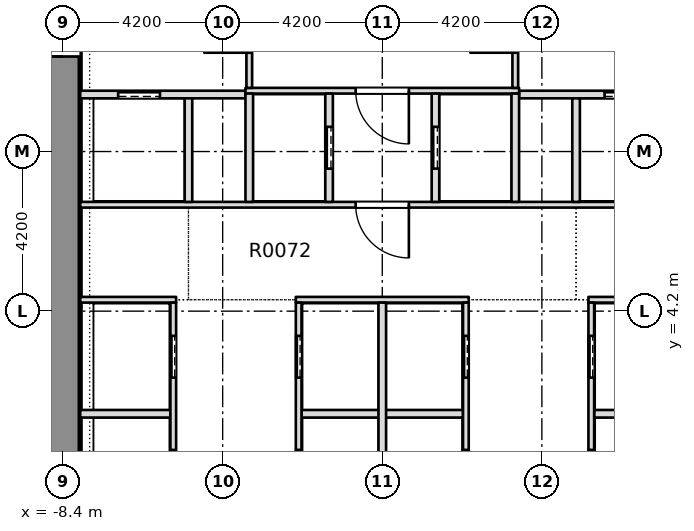
"""IFC4 building model, lengths in metres.
Left out: names, types, materials, properties, quantities, classifications, styles, units other than length and angle.
Written with IfcOpenShell. Run it as: python <this file> out.ifc"""

import sys

from ifc_helpers import new_model, si_unit, direction, frame, frame_2d, origin, place, context, subcontext, project, spatial, rectangle, extrude, element, fill, save


model = new_model("IFC4")
c1 = context("Model", 3, precision=1e-05, world=origin(), true_north=direction((0.0, 1.0)))
c2 = subcontext(c1, "Body", "Model", "MODEL_VIEW")
j1 = project(units=[si_unit("LENGTHUNIT", "METRE"), si_unit("PLANEANGLEUNIT", "RADIAN")], contexts=[c1])
p1 = place(None, origin())
s1 = spatial("IfcSite", under=j1, at=p1, CompositionType="ELEMENT")
p2 = place(p1, origin())
s2 = spatial("IfcBuilding", under=s1, at=p2, CompositionType="ELEMENT")
p3 = place(p2, origin())
s3 = spatial("IfcBuildingStorey", under=s2, at=p3, CompositionType="ELEMENT", Elevation=0.0)
p4 = place(p3, frame((-8.4, -7.5, -0.45), z_axis=(0.0, 0.0, 1.0), x_axis=(0.0, 1.0, 0.0)))
e1 = element("IfcWall", 1, at=p4, inside=s3, PredefinedType="SHEAR", context=c2, shape_type="SweptSolid", body=[
    extrude(rectangle(XDim=28.35, YDim=0.9, at=frame_2d((14.175, 0.0))), origin(), (0.0, 0.0, 1.0), 7.55),
])
p5 = place(p4, frame((18.4, 0.0, 0.45)))
e2 = element("IfcOpeningElement", 2, at=p5, cuts=e1, PredefinedType="OPENING", context=c2, shape_type="SweptSolid", body=[
    extrude(rectangle(XDim=1.2, YDim=2.1, at=frame_2d((0.6, 1.05))), frame((0.0, 0.46, 0.0), z_axis=(0.0, -1.0, 0.0), x_axis=(1.0, 0.0, 0.0)), (0.0, 0.0, 1.0), 0.92),
])
p6 = place(p3, frame((-7.949, 1.5, 0.0), z_axis=(0.0, 0.0, 1.0), x_axis=(1.0, 0.0, 0.0)))
e3 = element("IfcWall", 3, at=p6, inside=s3, PredefinedType="PARTITIONING", context=c2, shape_type="SweptSolid", body=[
    extrude(rectangle(XDim=2.374, YDim=0.2, at=frame_2d((1.187, 0.0))), origin(), (0.0, 0.0, 1.0), 7.1),
])
p7 = place(p3, frame((-2.125, 1.5, 0.0), z_axis=(0.0, 0.0, 1.0), x_axis=(1.0, 0.0, 0.0)))
e4 = element("IfcWall", 4, at=p7, inside=s3, PredefinedType="PARTITIONING", context=c2, shape_type="SweptSolid", body=[
    extrude(rectangle(XDim=4.25, YDim=0.2, at=frame_2d((2.125, 0.0))), origin(), (0.0, 0.0, 1.0), 7.1),
])
p8 = place(p3, frame((5.575, 1.5, 0.0), z_axis=(0.0, 0.0, 1.0), x_axis=(1.0, 0.0, 0.0)))
e5 = element("IfcWall", 5, at=p8, inside=s3, PredefinedType="PARTITIONING", context=c2, shape_type="SweptSolid", body=[
    extrude(rectangle(XDim=2.374, YDim=0.2, at=frame_2d((1.187, 0.0))), origin(), (0.0, 0.0, 1.0), 7.1),
])
p9 = place(p3, frame((-7.949, 4.5, 0.0), z_axis=(0.0, 0.0, 1.0), x_axis=(1.0, 0.0, 0.0)))
e6 = element("IfcWall", 6, at=p9, inside=s3, PredefinedType="PARTITIONING", context=c2, shape_type="SweptSolid", body=[
    extrude(rectangle(XDim=2.524, YDim=0.15, at=frame_2d((1.262, 0.0))), origin(), (0.0, 0.0, 1.0), 7.1),
])
p10 = place(p3, frame((-2.275, 4.5, 0.0), z_axis=(0.0, 0.0, 1.0), x_axis=(1.0, 0.0, 0.0)))
e7 = element("IfcWall", 7, at=p10, inside=s3, PredefinedType="PARTITIONING", context=c2, shape_type="SweptSolid", body=[
    extrude(rectangle(XDim=4.55, YDim=0.15, at=frame_2d((2.275, 0.0))), origin(), (0.0, 0.0, 1.0), 7.1),
])
p11 = place(p3, frame((5.425, 4.5, 0.0), z_axis=(0.0, 0.0, 1.0), x_axis=(1.0, 0.0, 0.0)))
e8 = element("IfcWall", 8, at=p11, inside=s3, PredefinedType="PARTITIONING", context=c2, shape_type="SweptSolid", body=[
    extrude(rectangle(XDim=2.524, YDim=0.15, at=frame_2d((1.262, 0.0))), origin(), (0.0, 0.0, 1.0), 7.1),
])
p12 = place(p3, frame((-7.949, 7.0, 0.0), z_axis=(0.0, 0.0, 1.0), x_axis=(1.0, 0.0, 0.0)))
e9 = element("IfcWall", 9, at=p12, inside=s3, PredefinedType="PARTITIONING", context=c2, shape_type="SweptSolid", body=[
    extrude(rectangle(XDim=15.898, YDim=0.15, at=frame_2d((7.949, 0.0))), origin(), (0.0, 0.0, 1.0), 7.1),
])
p13 = place(p12, frame((7.249, 0.0, 0.0)))
e10 = element("IfcOpeningElement", 10, at=p13, cuts=e9, PredefinedType="OPENING", context=c2, shape_type="SweptSolid", body=[
    extrude(rectangle(XDim=1.4, YDim=2.1, at=frame_2d((0.7, 1.05))), frame((0.0, 0.085, 0.0), z_axis=(0.0, -1.0, 0.0), x_axis=(1.0, 0.0, 0.0)), (0.0, 0.0, 1.0), 0.17),
])
p14 = place(p3, frame((-7.949, 9.9, 0.0), z_axis=(0.0, 0.0, 1.0), x_axis=(1.0, 0.0, 0.0)))
e11 = element("IfcWall", 11, at=p14, inside=s3, PredefinedType="PARTITIONING", context=c2, shape_type="SweptSolid", body=[
    extrude(rectangle(XDim=4.349, YDim=0.2, at=frame_2d((2.174, 0.0))), origin(), (0.0, 0.0, 1.0), 7.1),
])
p15 = place(p14, frame((0.999, 0.0, 0.0)))
e12 = element("IfcOpeningElement", 12, at=p15, cuts=e11, PredefinedType="OPENING", context=c2, shape_type="SweptSolid", body=[
    extrude(rectangle(XDim=1.1, YDim=2.1, at=frame_2d((0.55, 1.05))), frame((0.0, 0.11, 0.0), z_axis=(0.0, -1.0, 0.0), x_axis=(1.0, 0.0, 0.0)), (0.0, 0.0, 1.0), 0.22),
])
p16 = place(p3, frame((3.6, 9.9, 0.0), z_axis=(0.0, 0.0, 1.0), x_axis=(1.0, 0.0, 0.0)))
e13 = element("IfcWall", 13, at=p16, inside=s3, PredefinedType="PARTITIONING", context=c2, shape_type="SweptSolid", body=[
    extrude(rectangle(XDim=4.349, YDim=0.2, at=frame_2d((2.174, 0.0))), origin(), (0.0, 0.0, 1.0), 7.1),
])
p17 = place(p16, frame((2.25, 0.0, 0.0)))
e14 = element("IfcOpeningElement", 14, at=p17, cuts=e13, PredefinedType="OPENING", context=c2, shape_type="SweptSolid", body=[
    extrude(rectangle(XDim=1.1, YDim=2.1, at=frame_2d((0.55, 1.05))), frame((0.0, 0.11, 0.0), z_axis=(0.0, -1.0, 0.0), x_axis=(1.0, 0.0, 0.0)), (0.0, 0.0, 1.0), 0.22),
])
p18 = place(p3, frame((-3.6, 10.0, 0.0), z_axis=(0.0, 0.0, 1.0), x_axis=(1.0, 0.0, 0.0)))
e15 = element("IfcWall", 15, at=p18, inside=s3, PredefinedType="PARTITIONING", context=c2, shape_type="SweptSolid", body=[
    extrude(rectangle(XDim=7.2, YDim=0.15, at=frame_2d((3.6, 0.0))), origin(), (0.0, 0.0, 1.0), 7.1),
])
p19 = place(p18, frame((2.9, 0.0, 0.0)))
e16 = element("IfcOpeningElement", 16, at=p19, cuts=e15, PredefinedType="OPENING", context=c2, shape_type="SweptSolid", body=[
    extrude(rectangle(XDim=1.4, YDim=2.1, at=frame_2d((0.7, 1.05))), frame((0.0, 0.085, 0.0), z_axis=(0.0, -1.0, 0.0), x_axis=(1.0, 0.0, 0.0)), (0.0, 0.0, 1.0), 0.17),
])
p20 = place(p3, frame((-5.5, -7.499, 0.0), z_axis=(0.0, 0.0, 1.0), x_axis=(0.0, 1.0, 0.0)))
e17 = element("IfcWall", 17, at=p20, inside=s3, PredefinedType="PARTITIONING", context=c2, shape_type="SweptSolid", body=[
    extrude(rectangle(XDim=11.924, YDim=0.15, at=frame_2d((5.962, 0.0))), origin(), (0.0, 0.0, 1.0), 7.1),
])
p21 = place(p20, frame((0.949, 0.0, 0.0)))
e18 = element("IfcOpeningElement", 18, at=p21, cuts=e17, PredefinedType="OPENING", context=c2, shape_type="SweptSolid", body=[
    extrude(rectangle(XDim=1.1, YDim=2.1, at=frame_2d((0.55, 1.05))), frame((0.0, 0.085, 0.0), z_axis=(0.0, -1.0, 0.0), x_axis=(1.0, 0.0, 0.0)), (0.0, 0.0, 1.0), 0.17),
])
p22 = place(p20, frame((3.949, 0.0, 0.0)))
e19 = element("IfcOpeningElement", 19, at=p22, cuts=e17, PredefinedType="OPENING", context=c2, shape_type="SweptSolid", body=[
    extrude(rectangle(XDim=1.1, YDim=2.1, at=frame_2d((0.55, 1.05))), frame((0.0, 0.085, 0.0), z_axis=(0.0, -1.0, 0.0), x_axis=(1.0, 0.0, 0.0)), (0.0, 0.0, 1.0), 0.17),
])
p23 = place(p20, frame((6.949, 0.0, 0.0)))
e20 = element("IfcOpeningElement", 20, at=p23, cuts=e17, PredefinedType="OPENING", context=c2, shape_type="SweptSolid", body=[
    extrude(rectangle(XDim=1.1, YDim=2.1, at=frame_2d((0.55, 1.05))), frame((0.0, 0.085, 0.0), z_axis=(0.0, -1.0, 0.0), x_axis=(1.0, 0.0, 0.0)), (0.0, 0.0, 1.0), 0.17),
])
p24 = place(p20, frame((9.949, 0.0, 0.0)))
e21 = element("IfcOpeningElement", 21, at=p24, cuts=e17, PredefinedType="OPENING", context=c2, shape_type="SweptSolid", body=[
    extrude(rectangle(XDim=1.1, YDim=2.1, at=frame_2d((0.55, 1.05))), frame((0.0, 0.085, 0.0), z_axis=(0.0, -1.0, 0.0), x_axis=(1.0, 0.0, 0.0)), (0.0, 0.0, 1.0), 0.17),
])
p25 = place(p3, frame((-5.1, 7.075, 0.0), z_axis=(0.0, 0.0, 1.0), x_axis=(0.0, 1.0, 0.0)))
e22 = element("IfcWall", 22, at=p25, inside=s3, PredefinedType="PARTITIONING", context=c2, shape_type="SweptSolid", body=[
    extrude(rectangle(XDim=2.725, YDim=0.2, at=frame_2d((1.363, 0.0))), origin(), (0.0, 0.0, 1.0), 7.1),
])
p26 = place(p3, frame((-3.5, 7.075, 0.0), z_axis=(0.0, 0.0, 1.0), x_axis=(0.0, 1.0, 0.0)))
e23 = element("IfcWall", 23, at=p26, inside=s3, PredefinedType="PARTITIONING", context=c2, shape_type="SweptSolid", body=[
    extrude(rectangle(XDim=2.85, YDim=0.2, at=frame_2d((1.425, 0.0))), origin(), (0.0, 0.0, 1.0), 7.1),
])
p27 = place(p3, frame((-3.5, 10.075, 0.0), z_axis=(0.0, 0.0, 1.0), x_axis=(0.0, 1.0, 0.0)))
e24 = element("IfcWall", 24, at=p27, inside=s3, PredefinedType="PARTITIONING", context=c2, shape_type="SweptSolid", body=[
    extrude(rectangle(XDim=3.075, YDim=0.15, at=frame_2d((1.538, 0.0))), origin(), (0.0, 0.0, 1.0), 7.1),
])
p28 = place(p27, frame((0.925, 0.0, 0.0)))
e25 = element("IfcOpeningElement", 25, at=p28, cuts=e24, PredefinedType="OPENING", context=c2, shape_type="SweptSolid", body=[
    extrude(rectangle(XDim=1.2, YDim=2.1, at=frame_2d((0.6, 1.05))), frame((0.0, 0.085, 0.0), z_axis=(0.0, -1.0, 0.0), x_axis=(1.0, 0.0, 0.0)), (0.0, 0.0, 1.0), 0.17),
])
p29 = place(p3, frame((-2.2, -7.499, 0.0), z_axis=(0.0, 0.0, 1.0), x_axis=(0.0, 1.0, 0.0)))
e26 = element("IfcWall", 26, at=p29, inside=s3, PredefinedType="PARTITIONING", context=c2, shape_type="SweptSolid", body=[
    extrude(rectangle(XDim=11.924, YDim=0.15, at=frame_2d((5.962, 0.0))), origin(), (0.0, 0.0, 1.0), 7.1),
])
p30 = place(p29, frame((0.949, 0.0, 0.0)))
e27 = element("IfcOpeningElement", 27, at=p30, cuts=e26, PredefinedType="OPENING", context=c2, shape_type="SweptSolid", body=[
    extrude(rectangle(XDim=1.1, YDim=2.1, at=frame_2d((0.55, 1.05))), frame((0.0, 0.085, 0.0), z_axis=(0.0, -1.0, 0.0), x_axis=(1.0, 0.0, 0.0)), (0.0, 0.0, 1.0), 0.17),
])
p31 = place(p29, frame((3.949, 0.0, 0.0)))
e28 = element("IfcOpeningElement", 28, at=p31, cuts=e26, PredefinedType="OPENING", context=c2, shape_type="SweptSolid", body=[
    extrude(rectangle(XDim=1.1, YDim=2.1, at=frame_2d((0.55, 1.05))), frame((0.0, 0.085, 0.0), z_axis=(0.0, -1.0, 0.0), x_axis=(1.0, 0.0, 0.0)), (0.0, 0.0, 1.0), 0.17),
])
p32 = place(p29, frame((6.949, 0.0, 0.0)))
e29 = element("IfcOpeningElement", 29, at=p32, cuts=e26, PredefinedType="OPENING", context=c2, shape_type="SweptSolid", body=[
    extrude(rectangle(XDim=1.1, YDim=2.1, at=frame_2d((0.55, 1.05))), frame((0.0, 0.085, 0.0), z_axis=(0.0, -1.0, 0.0), x_axis=(1.0, 0.0, 0.0)), (0.0, 0.0, 1.0), 0.17),
])
p33 = place(p29, frame((9.949, 0.0, 0.0)))
e30 = element("IfcOpeningElement", 30, at=p33, cuts=e26, PredefinedType="OPENING", context=c2, shape_type="SweptSolid", body=[
    extrude(rectangle(XDim=1.1, YDim=2.1, at=frame_2d((0.55, 1.05))), frame((0.0, 0.085, 0.0), z_axis=(0.0, -1.0, 0.0), x_axis=(1.0, 0.0, 0.0)), (0.0, 0.0, 1.0), 0.17),
])
p34 = place(p3, frame((-1.4, 7.075, 0.0), z_axis=(0.0, 0.0, 1.0), x_axis=(0.0, 1.0, 0.0)))
e31 = element("IfcWall", 31, at=p34, inside=s3, PredefinedType="PARTITIONING", context=c2, shape_type="SweptSolid", body=[
    extrude(rectangle(XDim=2.85, YDim=0.2, at=frame_2d((1.425, 0.0))), origin(), (0.0, 0.0, 1.0), 7.1),
])
p35 = place(p34, frame((0.875, 0.0, 0.0)))
e32 = element("IfcOpeningElement", 32, at=p35, cuts=e31, PredefinedType="OPENING", context=c2, shape_type="SweptSolid", body=[
    extrude(rectangle(XDim=1.1, YDim=2.1, at=frame_2d((0.55, 1.05))), frame((0.0, 0.11, 0.0), z_axis=(0.0, -1.0, 0.0), x_axis=(1.0, 0.0, 0.0)), (0.0, 0.0, 1.0), 0.22),
])
p36 = place(p3, frame((0.0, -7.499, 0.0), z_axis=(0.0, 0.0, 1.0), x_axis=(0.0, 1.0, 0.0)))
e33 = element("IfcWall", 33, at=p36, inside=s3, PredefinedType="PARTITIONING", context=c2, shape_type="SweptSolid", body=[
    extrude(rectangle(XDim=11.924, YDim=0.2, at=frame_2d((5.962, 0.0))), origin(), (0.0, 0.0, 1.0), 7.1),
])
p37 = place(p3, frame((1.4, 7.075, 0.0), z_axis=(0.0, 0.0, 1.0), x_axis=(0.0, 1.0, 0.0)))
e34 = element("IfcWall", 34, at=p37, inside=s3, PredefinedType="PARTITIONING", context=c2, shape_type="SweptSolid", body=[
    extrude(rectangle(XDim=2.85, YDim=0.2, at=frame_2d((1.425, 0.0))), origin(), (0.0, 0.0, 1.0), 7.1),
])
p38 = place(p37, frame((0.875, 0.0, 0.0)))
e35 = element("IfcOpeningElement", 35, at=p38, cuts=e34, PredefinedType="OPENING", context=c2, shape_type="SweptSolid", body=[
    extrude(rectangle(XDim=1.1, YDim=2.1, at=frame_2d((0.55, 1.05))), frame((0.0, 0.11, 0.0), z_axis=(0.0, -1.0, 0.0), x_axis=(1.0, 0.0, 0.0)), (0.0, 0.0, 1.0), 0.22),
])
p39 = place(p3, frame((2.2, -7.499, 0.0), z_axis=(0.0, 0.0, 1.0), x_axis=(0.0, 1.0, 0.0)))
e36 = element("IfcWall", 36, at=p39, inside=s3, PredefinedType="PARTITIONING", context=c2, shape_type="SweptSolid", body=[
    extrude(rectangle(XDim=11.924, YDim=0.15, at=frame_2d((5.962, 0.0))), origin(), (0.0, 0.0, 1.0), 7.1),
])
p40 = place(p39, frame((0.949, 0.0, 0.0)))
e37 = element("IfcOpeningElement", 37, at=p40, cuts=e36, PredefinedType="OPENING", context=c2, shape_type="SweptSolid", body=[
    extrude(rectangle(XDim=1.1, YDim=2.1, at=frame_2d((0.55, 1.05))), frame((0.0, 0.085, 0.0), z_axis=(0.0, -1.0, 0.0), x_axis=(1.0, 0.0, 0.0)), (0.0, 0.0, 1.0), 0.17),
])
p41 = place(p39, frame((3.949, 0.0, 0.0)))
e38 = element("IfcOpeningElement", 38, at=p41, cuts=e36, PredefinedType="OPENING", context=c2, shape_type="SweptSolid", body=[
    extrude(rectangle(XDim=1.1, YDim=2.1, at=frame_2d((0.55, 1.05))), frame((0.0, 0.085, 0.0), z_axis=(0.0, -1.0, 0.0), x_axis=(1.0, 0.0, 0.0)), (0.0, 0.0, 1.0), 0.17),
])
p42 = place(p39, frame((6.949, 0.0, 0.0)))
e39 = element("IfcOpeningElement", 39, at=p42, cuts=e36, PredefinedType="OPENING", context=c2, shape_type="SweptSolid", body=[
    extrude(rectangle(XDim=1.1, YDim=2.1, at=frame_2d((0.55, 1.05))), frame((0.0, 0.085, 0.0), z_axis=(0.0, -1.0, 0.0), x_axis=(1.0, 0.0, 0.0)), (0.0, 0.0, 1.0), 0.17),
])
p43 = place(p39, frame((9.949, 0.0, 0.0)))
e40 = element("IfcOpeningElement", 40, at=p43, cuts=e36, PredefinedType="OPENING", context=c2, shape_type="SweptSolid", body=[
    extrude(rectangle(XDim=1.1, YDim=2.1, at=frame_2d((0.55, 1.05))), frame((0.0, 0.085, 0.0), z_axis=(0.0, -1.0, 0.0), x_axis=(1.0, 0.0, 0.0)), (0.0, 0.0, 1.0), 0.17),
])
p44 = place(p3, frame((3.5, 7.075, 0.0), z_axis=(0.0, 0.0, 1.0), x_axis=(0.0, 1.0, 0.0)))
e41 = element("IfcWall", 41, at=p44, inside=s3, PredefinedType="PARTITIONING", context=c2, shape_type="SweptSolid", body=[
    extrude(rectangle(XDim=2.85, YDim=0.2, at=frame_2d((1.425, 0.0))), origin(), (0.0, 0.0, 1.0), 7.1),
])
p45 = place(p3, frame((3.5, 10.075, 0.0), z_axis=(0.0, 0.0, 1.0), x_axis=(0.0, 1.0, 0.0)))
e42 = element("IfcWall", 42, at=p45, inside=s3, PredefinedType="PARTITIONING", context=c2, shape_type="SweptSolid", body=[
    extrude(rectangle(XDim=3.075, YDim=0.15, at=frame_2d((1.538, 0.0))), origin(), (0.0, 0.0, 1.0), 7.1),
])
p46 = place(p45, frame((0.925, 0.0, 0.0)))
e43 = element("IfcOpeningElement", 43, at=p46, cuts=e42, PredefinedType="OPENING", context=c2, shape_type="SweptSolid", body=[
    extrude(rectangle(XDim=1.2, YDim=2.1, at=frame_2d((0.6, 1.05))), frame((0.0, 0.085, 0.0), z_axis=(0.0, -1.0, 0.0), x_axis=(1.0, 0.0, 0.0)), (0.0, 0.0, 1.0), 0.17),
])
p47 = place(p3, frame((5.1, 7.075, 0.0), z_axis=(0.0, 0.0, 1.0), x_axis=(0.0, 1.0, 0.0)))
e44 = element("IfcWall", 44, at=p47, inside=s3, PredefinedType="PARTITIONING", context=c2, shape_type="SweptSolid", body=[
    extrude(rectangle(XDim=2.725, YDim=0.2, at=frame_2d((1.363, 0.0))), origin(), (0.0, 0.0, 1.0), 7.1),
])
p48 = place(p3, frame((5.5, -7.499, 0.0), z_axis=(0.0, 0.0, 1.0), x_axis=(0.0, 1.0, 0.0)))
e45 = element("IfcWall", 45, at=p48, inside=s3, PredefinedType="PARTITIONING", context=c2, shape_type="SweptSolid", body=[
    extrude(rectangle(XDim=11.924, YDim=0.15, at=frame_2d((5.962, 0.0))), origin(), (0.0, 0.0, 1.0), 7.1),
])
p49 = place(p48, frame((0.949, 0.0, 0.0)))
e46 = element("IfcOpeningElement", 46, at=p49, cuts=e45, PredefinedType="OPENING", context=c2, shape_type="SweptSolid", body=[
    extrude(rectangle(XDim=1.1, YDim=2.1, at=frame_2d((0.55, 1.05))), frame((0.0, 0.085, 0.0), z_axis=(0.0, -1.0, 0.0), x_axis=(1.0, 0.0, 0.0)), (0.0, 0.0, 1.0), 0.17),
])
p50 = place(p48, frame((3.949, 0.0, 0.0)))
e47 = element("IfcOpeningElement", 47, at=p50, cuts=e45, PredefinedType="OPENING", context=c2, shape_type="SweptSolid", body=[
    extrude(rectangle(XDim=1.1, YDim=2.1, at=frame_2d((0.55, 1.05))), frame((0.0, 0.085, 0.0), z_axis=(0.0, -1.0, 0.0), x_axis=(1.0, 0.0, 0.0)), (0.0, 0.0, 1.0), 0.17),
])
p51 = place(p48, frame((6.949, 0.0, 0.0)))
e48 = element("IfcOpeningElement", 48, at=p51, cuts=e45, PredefinedType="OPENING", context=c2, shape_type="SweptSolid", body=[
    extrude(rectangle(XDim=1.1, YDim=2.1, at=frame_2d((0.55, 1.05))), frame((0.0, 0.085, 0.0), z_axis=(0.0, -1.0, 0.0), x_axis=(1.0, 0.0, 0.0)), (0.0, 0.0, 1.0), 0.17),
])
p52 = place(p48, frame((9.949, 0.0, 0.0)))
e49 = element("IfcOpeningElement", 49, at=p52, cuts=e45, PredefinedType="OPENING", context=c2, shape_type="SweptSolid", body=[
    extrude(rectangle(XDim=1.1, YDim=2.1, at=frame_2d((0.55, 1.05))), frame((0.0, 0.085, 0.0), z_axis=(0.0, -1.0, 0.0), x_axis=(1.0, 0.0, 0.0)), (0.0, 0.0, 1.0), 0.17),
])
p53 = place(p23, origin())
e50 = element("IfcDoor", 50, at=p53, inside=s3, OperationType="SLIDING_TO_RIGHT", PredefinedType="DOOR", context=c2, shape_type="SweptSolid", body=[
    extrude(rectangle(XDim=1.1, YDim=2.1, at=frame_2d((0.55, 1.05))), frame((0.0, 0.025, 0.0), z_axis=(0.0, -1.0, 0.0), x_axis=(1.0, 0.0, 0.0)), (0.0, 0.0, 1.0), 0.05),
])
fill(e20, e50)
p54 = place(p24, origin())
e51 = element("IfcDoor", 51, at=p54, inside=s3, OperationType="SLIDING_TO_RIGHT", PredefinedType="DOOR", context=c2, shape_type="SweptSolid", body=[
    extrude(rectangle(XDim=1.1, YDim=2.1, at=frame_2d((0.55, 1.05))), frame((0.0, 0.025, 0.0), z_axis=(0.0, -1.0, 0.0), x_axis=(1.0, 0.0, 0.0)), (0.0, 0.0, 1.0), 0.05),
])
fill(e21, e51)
p55 = place(p32, origin())
e52 = element("IfcDoor", 52, at=p55, inside=s3, OperationType="SLIDING_TO_RIGHT", PredefinedType="DOOR", context=c2, shape_type="SweptSolid", body=[
    extrude(rectangle(XDim=1.1, YDim=2.1, at=frame_2d((0.55, 1.05))), frame((0.0, 0.025, 0.0), z_axis=(0.0, -1.0, 0.0), x_axis=(1.0, 0.0, 0.0)), (0.0, 0.0, 1.0), 0.05),
])
fill(e29, e52)
p56 = place(p33, origin())
e53 = element("IfcDoor", 53, at=p56, inside=s3, OperationType="SLIDING_TO_RIGHT", PredefinedType="DOOR", context=c2, shape_type="SweptSolid", body=[
    extrude(rectangle(XDim=1.1, YDim=2.1, at=frame_2d((0.55, 1.05))), frame((0.0, 0.025, 0.0), z_axis=(0.0, -1.0, 0.0), x_axis=(1.0, 0.0, 0.0)), (0.0, 0.0, 1.0), 0.05),
])
fill(e30, e53)
p57 = place(p42, origin())
e54 = element("IfcDoor", 54, at=p57, inside=s3, OperationType="SLIDING_TO_RIGHT", PredefinedType="DOOR", context=c2, shape_type="SweptSolid", body=[
    extrude(rectangle(XDim=1.1, YDim=2.1, at=frame_2d((0.55, 1.05))), frame((0.0, 0.025, 0.0), z_axis=(0.0, -1.0, 0.0), x_axis=(1.0, 0.0, 0.0)), (0.0, 0.0, 1.0), 0.05),
])
fill(e39, e54)
p58 = place(p43, origin())
e55 = element("IfcDoor", 55, at=p58, inside=s3, OperationType="SLIDING_TO_RIGHT", PredefinedType="DOOR", context=c2, shape_type="SweptSolid", body=[
    extrude(rectangle(XDim=1.1, YDim=2.1, at=frame_2d((0.55, 1.05))), frame((0.0, 0.025, 0.0), z_axis=(0.0, -1.0, 0.0), x_axis=(1.0, 0.0, 0.0)), (0.0, 0.0, 1.0), 0.05),
])
fill(e40, e55)
p59 = place(p51, origin())
e56 = element("IfcDoor", 56, at=p59, inside=s3, OperationType="SLIDING_TO_RIGHT", PredefinedType="DOOR", context=c2, shape_type="SweptSolid", body=[
    extrude(rectangle(XDim=1.1, YDim=2.1, at=frame_2d((0.55, 1.05))), frame((0.0, 0.025, 0.0), z_axis=(0.0, -1.0, 0.0), x_axis=(1.0, 0.0, 0.0)), (0.0, 0.0, 1.0), 0.05),
])
fill(e48, e56)
p60 = place(p52, origin())
e57 = element("IfcDoor", 57, at=p60, inside=s3, OperationType="SLIDING_TO_RIGHT", PredefinedType="DOOR", context=c2, shape_type="SweptSolid", body=[
    extrude(rectangle(XDim=1.1, YDim=2.1, at=frame_2d((0.55, 1.05))), frame((0.0, 0.025, 0.0), z_axis=(0.0, -1.0, 0.0), x_axis=(1.0, 0.0, 0.0)), (0.0, 0.0, 1.0), 0.05),
])
fill(e49, e57)
p61 = place(p15, origin())
e58 = element("IfcDoor", 58, at=p61, inside=s3, OperationType="SLIDING_TO_RIGHT", PredefinedType="DOOR", context=c2, shape_type="SweptSolid", body=[
    extrude(rectangle(XDim=1.1, YDim=2.1, at=frame_2d((0.55, 1.05))), frame((0.0, 0.025, 0.0), z_axis=(0.0, -1.0, 0.0), x_axis=(1.0, 0.0, 0.0)), (0.0, 0.0, 1.0), 0.05),
])
fill(e12, e58)
p62 = place(p17, origin())
e59 = element("IfcDoor", 59, at=p62, inside=s3, OperationType="SLIDING_TO_LEFT", PredefinedType="DOOR", context=c2, shape_type="SweptSolid", body=[
    extrude(rectangle(XDim=1.1, YDim=2.1, at=frame_2d((0.55, 1.05))), frame((0.0, 0.025, 0.0), z_axis=(0.0, -1.0, 0.0), x_axis=(1.0, 0.0, 0.0)), (0.0, 0.0, 1.0), 0.05),
])
fill(e14, e59)
p63 = place(p13, origin())
e60 = element("IfcDoor", 60, at=p63, inside=s3, OperationType="SINGLE_SWING_RIGHT", PredefinedType="DOOR", context=c2, shape_type="SweptSolid", body=[
    extrude(rectangle(XDim=1.4, YDim=2.1, at=frame_2d((0.7, 1.05))), frame((0.0, 0.025, 0.0), z_axis=(0.0, -1.0, 0.0), x_axis=(1.0, 0.0, 0.0)), (0.0, 0.0, 1.0), 0.05),
])
fill(e10, e60)
p64 = place(p19, origin())
e61 = element("IfcDoor", 61, at=p64, inside=s3, OperationType="SINGLE_SWING_RIGHT", PredefinedType="DOOR", context=c2, shape_type="SweptSolid", body=[
    extrude(rectangle(XDim=1.4, YDim=2.1, at=frame_2d((0.7, 1.05))), frame((0.0, 0.025, 0.0), z_axis=(0.0, -1.0, 0.0), x_axis=(1.0, 0.0, 0.0)), (0.0, 0.0, 1.0), 0.05),
])
fill(e16, e61)
p65 = place(p35, origin())
e62 = element("IfcDoor", 62, at=p65, inside=s3, OperationType="SLIDING_TO_RIGHT", PredefinedType="DOOR", context=c2, shape_type="SweptSolid", body=[
    extrude(rectangle(XDim=1.1, YDim=2.1, at=frame_2d((0.55, 1.05))), frame((0.0, 0.025, 0.0), z_axis=(0.0, -1.0, 0.0), x_axis=(1.0, 0.0, 0.0)), (0.0, 0.0, 1.0), 0.05),
])
fill(e32, e62)
p66 = place(p38, origin())
e63 = element("IfcDoor", 63, at=p66, inside=s3, OperationType="SLIDING_TO_RIGHT", PredefinedType="DOOR", context=c2, shape_type="SweptSolid", body=[
    extrude(rectangle(XDim=1.1, YDim=2.1, at=frame_2d((0.55, 1.05))), frame((0.0, 0.025, 0.0), z_axis=(0.0, -1.0, 0.0), x_axis=(1.0, 0.0, 0.0)), (0.0, 0.0, 1.0), 0.05),
])
fill(e35, e63)
p67 = place(p5, origin())
e64 = element("IfcDoor", 64, at=p67, inside=s3, OperationType="SINGLE_SWING_LEFT", PredefinedType="DOOR", context=c2, shape_type="SweptSolid", body=[
    extrude(rectangle(XDim=1.2, YDim=2.1, at=frame_2d((0.6, 1.05))), frame((0.0, 0.025, 0.0), z_axis=(0.0, -1.0, 0.0), x_axis=(1.0, 0.0, 0.0)), (0.0, 0.0, 1.0), 0.05),
])
fill(e2, e64)
save(model, sys.argv[1])
